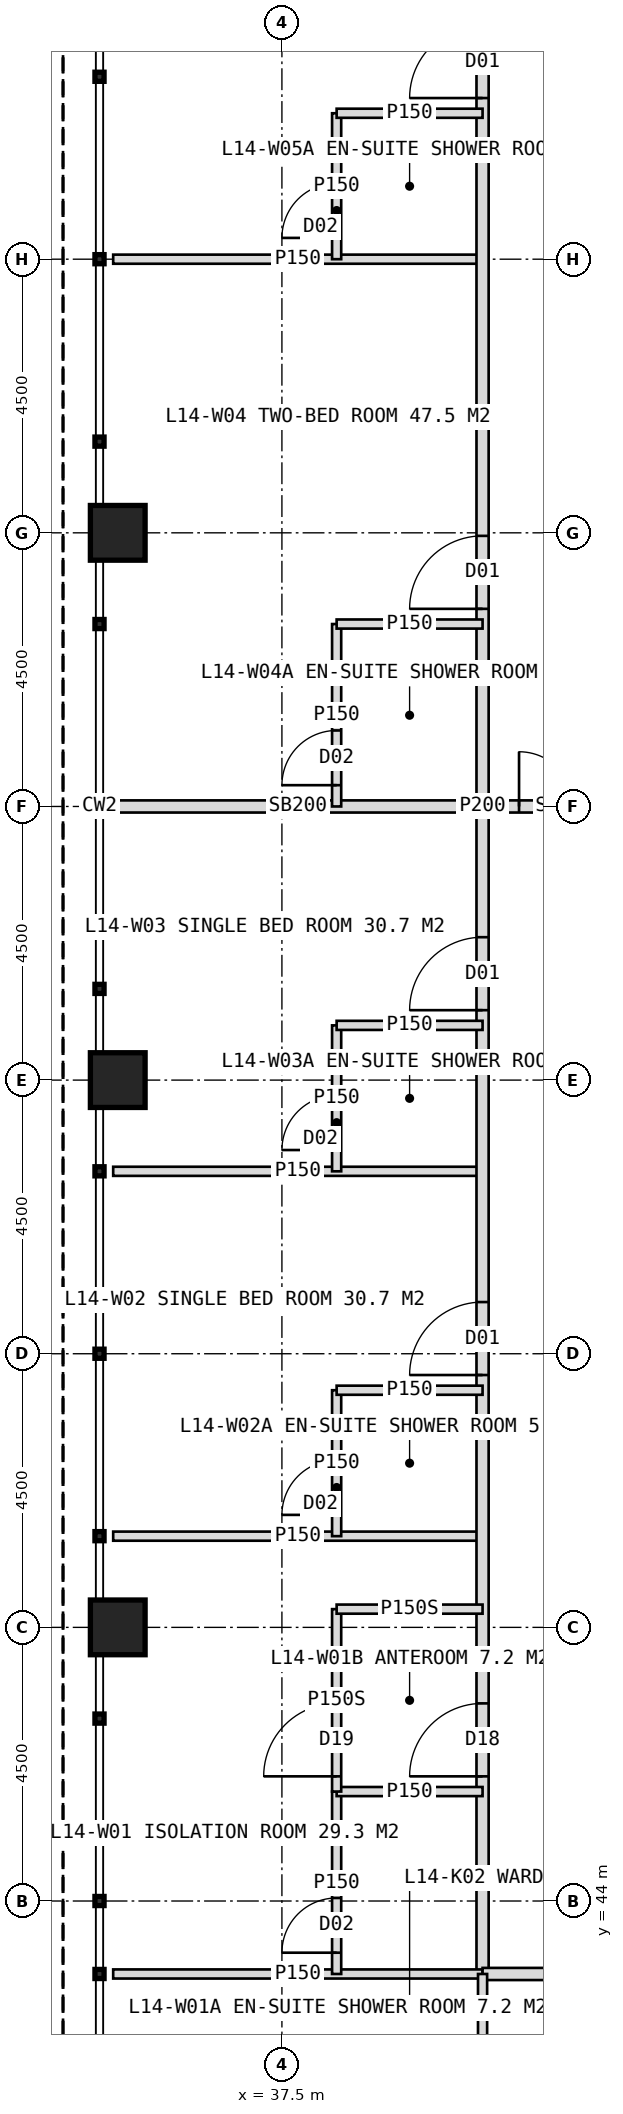
"""IFC4 building model, lengths in metres.
Left out: names, types, materials, properties, quantities, classifications, styles, units other than length and angle.
Written with IfcOpenShell. Run it as: python <this file> out.ifc"""

import sys

from ifc_helpers import new_model, si_unit, direction, frame, frame_2d, origin, origin_2d, place, context, subcontext, project, spatial, rectangle, hollow_rectangle, extrude, element, fill, save


model = new_model("IFC4")
c1 = context("Model", 3, precision=1e-05, world=origin(), true_north=direction((0.0, 1.0)))
c2 = subcontext(c1, "Body", "Model", "MODEL_VIEW")
j1 = project(units=[si_unit("LENGTHUNIT", "METRE"), si_unit("PLANEANGLEUNIT", "RADIAN")], contexts=[c1])
p1 = place(None, origin())
s1 = spatial("IfcSite", under=j1, at=p1, CompositionType="ELEMENT")
p2 = place(p1, origin())
s2 = spatial("IfcBuilding", under=s1, at=p2, CompositionType="ELEMENT")
p3 = place(p2, frame((0.0, 0.0, 63.0)))
s3 = spatial("IfcBuildingStorey", under=s2, at=p3, CompositionType="ELEMENT", Elevation=63.0)
for number, where, z_axis, x_axis in (
    (1, (34.8, 48.5, 0.0), (0.0, 0.0, 1.0), (1.0, 0.0, 0.0)),
    (2, (34.8, 57.5, 0.0), (0.0, 0.0, 1.0), (1.0, 0.0, 0.0)),
    (3, (34.8, 66.5, 0.0), (0.0, 0.0, 1.0), (1.0, 0.0, 0.0)),
):
    element("IfcColumn", number, at=place(p3, frame(where, z_axis=z_axis, x_axis=x_axis)), inside=s3, PredefinedType="COLUMN", context=c2, shape_type="SweptSolid", body=[
        extrude(hollow_rectangle(XDim=0.9, YDim=0.9, WallThickness=0.08, at=origin_2d()), origin(), (0.0, 0.0, 1.0), 4.0),
    ])
for number, where, z_axis, x_axis in (
    (4, (40.8, 50.0, 0.0), (0.0, 0.0, 1.0), (-1.0, 0.0, 0.0)),
    (5, (40.8, 56.0, 0.0), (0.0, 0.0, 1.0), (-1.0, 0.0, 0.0)),
):
    element("IfcWall", number, at=place(p3, frame(where, z_axis=z_axis, x_axis=x_axis)), inside=s3, PredefinedType="PARTITIONING", context=c2, shape_type="SweptSolid", body=[
        extrude(rectangle(XDim=6.075, YDim=0.15, at=frame_2d((3.038, 0.0))), origin(), (0.0, 0.0, 1.0), 3.75),
    ])
p4 = place(p3, frame((40.8, 62.0, 0.0), z_axis=(0.0, 0.0, 1.0), x_axis=(-1.0, 0.0, 0.0)))
e6 = element("IfcWall", 6, at=p4, inside=s3, PredefinedType="SOLIDWALL", context=c2, shape_type="SweptSolid", body=[
    extrude(rectangle(XDim=6.075, YDim=0.2, at=frame_2d((3.038, 0.0))), origin(), (0.0, 0.0, 1.0), 2.75),
])
p5 = place(p3, frame((40.8, 71.0, 0.0), z_axis=(0.0, 0.0, 1.0), x_axis=(-1.0, 0.0, 0.0)))
e7 = element("IfcWall", 7, at=p5, inside=s3, PredefinedType="PARTITIONING", context=c2, shape_type="SweptSolid", body=[
    extrude(rectangle(XDim=6.075, YDim=0.15, at=frame_2d((3.038, 0.0))), origin(), (0.0, 0.0, 1.0), 3.75),
])
p6 = place(p3, frame((40.8, 42.8, 0.0), z_axis=(0.0, 0.0, 1.0), x_axis=(0.0, 1.0, 0.0)))
e8 = element("IfcWall", 8, at=p6, inside=s3, PredefinedType="PARTITIONING", context=c2, shape_type="SweptSolid", body=[
    extrude(rectangle(XDim=38.4, YDim=0.2, at=frame_2d((19.2, 0.0))), origin(), (0.0, 0.0, 1.0), 3.75),
])
p7 = place(p6, frame((3.25, 0.0, 0.0)))
e9 = element("IfcOpeningElement", 9, at=p7, cuts=e8, PredefinedType="OPENING", context=c2, shape_type="SweptSolid", body=[
    extrude(rectangle(XDim=1.2, YDim=2.2, at=frame_2d((0.6, 1.1))), frame((0.0, 0.11, 0.0), z_axis=(0.0, -1.0, 0.0), x_axis=(1.0, 0.0, 0.0)), (0.0, 0.0, 1.0), 0.22),
])
p8 = place(p6, frame((9.85, 0.0, 0.0)))
e10 = element("IfcOpeningElement", 10, at=p8, cuts=e8, PredefinedType="OPENING", context=c2, shape_type="SweptSolid", body=[
    extrude(rectangle(XDim=1.2, YDim=2.2, at=frame_2d((0.6, 1.1))), frame((0.0, 0.11, 0.0), z_axis=(0.0, -1.0, 0.0), x_axis=(1.0, 0.0, 0.0)), (0.0, 0.0, 1.0), 0.22),
])
p9 = place(p6, frame((15.85, 0.0, 0.0)))
e11 = element("IfcOpeningElement", 11, at=p9, cuts=e8, PredefinedType="OPENING", context=c2, shape_type="SweptSolid", body=[
    extrude(rectangle(XDim=1.2, YDim=2.2, at=frame_2d((0.6, 1.1))), frame((0.0, 0.11, 0.0), z_axis=(0.0, -1.0, 0.0), x_axis=(1.0, 0.0, 0.0)), (0.0, 0.0, 1.0), 0.22),
])
p10 = place(p6, frame((22.45, 0.0, 0.0)))
e12 = element("IfcOpeningElement", 12, at=p10, cuts=e8, PredefinedType="OPENING", context=c2, shape_type="SweptSolid", body=[
    extrude(rectangle(XDim=1.2, YDim=2.2, at=frame_2d((0.6, 1.1))), frame((0.0, 0.11, 0.0), z_axis=(0.0, -1.0, 0.0), x_axis=(1.0, 0.0, 0.0)), (0.0, 0.0, 1.0), 0.22),
])
p11 = place(p6, frame((30.85, 0.0, 0.0)))
e13 = element("IfcOpeningElement", 13, at=p11, cuts=e8, PredefinedType="OPENING", context=c2, shape_type="SweptSolid", body=[
    extrude(rectangle(XDim=1.2, YDim=2.2, at=frame_2d((0.6, 1.1))), frame((0.0, 0.11, 0.0), z_axis=(0.0, -1.0, 0.0), x_axis=(1.0, 0.0, 0.0)), (0.0, 0.0, 1.0), 0.22),
])
p12 = place(p3, frame((40.8, 42.8, 0.0), z_axis=(0.0, 0.0, 1.0), x_axis=(-1.0, 0.0, 0.0)))
e14 = element("IfcWall", 14, at=p12, inside=s3, PredefinedType="PARTITIONING", context=c2, shape_type="SweptSolid", body=[
    extrude(rectangle(XDim=6.075, YDim=0.15, at=frame_2d((3.038, 0.0))), origin(), (0.0, 0.0, 1.0), 3.75),
])
p13 = place(p3, frame((38.4, 42.8, 0.0), z_axis=(0.0, 0.0, 1.0), x_axis=(0.0, 1.0, 0.0)))
e15 = element("IfcWall", 15, at=p13, inside=s3, PredefinedType="PARTITIONING", context=c2, shape_type="SweptSolid", body=[
    extrude(rectangle(XDim=3.0, YDim=0.15, at=frame_2d((1.5, 0.0))), origin(), (0.0, 0.0, 1.0), 3.75),
])
p14 = place(p13, frame((0.35, 0.0, 0.0)))
e16 = element("IfcOpeningElement", 16, at=p14, cuts=e15, PredefinedType="OPENING", context=c2, shape_type="SweptSolid", body=[
    extrude(rectangle(XDim=0.9, YDim=2.1, at=frame_2d((0.45, 1.05))), frame((0.0, 0.085, 0.0), z_axis=(0.0, -1.0, 0.0), x_axis=(1.0, 0.0, 0.0)), (0.0, 0.0, 1.0), 0.17),
])
p15 = place(p3, frame((40.8, 45.8, 0.0), z_axis=(0.0, 0.0, 1.0), x_axis=(-1.0, 0.0, 0.0)))
e17 = element("IfcWall", 17, at=p15, inside=s3, PredefinedType="PARTITIONING", context=c2, shape_type="SweptSolid", body=[
    extrude(rectangle(XDim=2.4, YDim=0.15, at=frame_2d((1.2, 0.0))), origin(), (0.0, 0.0, 1.0), 3.75),
])
p16 = place(p3, frame((38.4, 45.8, 0.0), z_axis=(0.0, 0.0, 1.0), x_axis=(0.0, 1.0, 0.0)))
e18 = element("IfcWall", 18, at=p16, inside=s3, PredefinedType="PARTITIONING", context=c2, shape_type="SweptSolid", body=[
    extrude(rectangle(XDim=3.0, YDim=0.15, at=frame_2d((1.5, 0.0))), origin(), (0.0, 0.0, 1.0), 3.75),
])
p17 = place(p16, frame((0.25, 0.0, 0.0)))
e19 = element("IfcOpeningElement", 19, at=p17, cuts=e18, PredefinedType="OPENING", context=c2, shape_type="SweptSolid", body=[
    extrude(rectangle(XDim=1.2, YDim=2.2, at=frame_2d((0.6, 1.1))), frame((0.0, 0.085, 0.0), z_axis=(0.0, -1.0, 0.0), x_axis=(1.0, 0.0, 0.0)), (0.0, 0.0, 1.0), 0.17),
])
p18 = place(p3, frame((40.8, 48.8, 0.0), z_axis=(0.0, 0.0, 1.0), x_axis=(-1.0, 0.0, 0.0)))
e20 = element("IfcWall", 20, at=p18, inside=s3, PredefinedType="PARTITIONING", context=c2, shape_type="SweptSolid", body=[
    extrude(rectangle(XDim=2.4, YDim=0.15, at=frame_2d((1.2, 0.0))), origin(), (0.0, 0.0, 1.0), 3.75),
])
p19 = place(p3, frame((38.4, 50.0, 0.0), z_axis=(0.0, 0.0, 1.0), x_axis=(0.0, 1.0, 0.0)))
e21 = element("IfcWall", 21, at=p19, inside=s3, PredefinedType="PARTITIONING", context=c2, shape_type="SweptSolid", body=[
    extrude(rectangle(XDim=2.4, YDim=0.15, at=frame_2d((1.2, 0.0))), origin(), (0.0, 0.0, 1.0), 3.75),
])
p20 = place(p19, frame((0.35, 0.0, 0.0)))
e22 = element("IfcOpeningElement", 22, at=p20, cuts=e21, PredefinedType="OPENING", context=c2, shape_type="SweptSolid", body=[
    extrude(rectangle(XDim=0.9, YDim=2.1, at=frame_2d((0.45, 1.05))), frame((0.0, 0.085, 0.0), z_axis=(0.0, -1.0, 0.0), x_axis=(1.0, 0.0, 0.0)), (0.0, 0.0, 1.0), 0.17),
])
p21 = place(p3, frame((40.8, 52.4, 0.0), z_axis=(0.0, 0.0, 1.0), x_axis=(-1.0, 0.0, 0.0)))
e23 = element("IfcWall", 23, at=p21, inside=s3, PredefinedType="PARTITIONING", context=c2, shape_type="SweptSolid", body=[
    extrude(rectangle(XDim=2.4, YDim=0.15, at=frame_2d((1.2, 0.0))), origin(), (0.0, 0.0, 1.0), 3.75),
])
p22 = place(p3, frame((38.4, 56.0, 0.0), z_axis=(0.0, 0.0, 1.0), x_axis=(0.0, 1.0, 0.0)))
e24 = element("IfcWall", 24, at=p22, inside=s3, PredefinedType="PARTITIONING", context=c2, shape_type="SweptSolid", body=[
    extrude(rectangle(XDim=2.4, YDim=0.15, at=frame_2d((1.2, 0.0))), origin(), (0.0, 0.0, 1.0), 3.75),
])
p23 = place(p22, frame((0.35, 0.0, 0.0)))
e25 = element("IfcOpeningElement", 25, at=p23, cuts=e24, PredefinedType="OPENING", context=c2, shape_type="SweptSolid", body=[
    extrude(rectangle(XDim=0.9, YDim=2.1, at=frame_2d((0.45, 1.05))), frame((0.0, 0.085, 0.0), z_axis=(0.0, -1.0, 0.0), x_axis=(1.0, 0.0, 0.0)), (0.0, 0.0, 1.0), 0.17),
])
p24 = place(p3, frame((40.8, 58.4, 0.0), z_axis=(0.0, 0.0, 1.0), x_axis=(-1.0, 0.0, 0.0)))
e26 = element("IfcWall", 26, at=p24, inside=s3, PredefinedType="PARTITIONING", context=c2, shape_type="SweptSolid", body=[
    extrude(rectangle(XDim=2.4, YDim=0.15, at=frame_2d((1.2, 0.0))), origin(), (0.0, 0.0, 1.0), 3.75),
])
p25 = place(p3, frame((38.4, 62.0, 0.0), z_axis=(0.0, 0.0, 1.0), x_axis=(0.0, 1.0, 0.0)))
e27 = element("IfcWall", 27, at=p25, inside=s3, PredefinedType="PARTITIONING", context=c2, shape_type="SweptSolid", body=[
    extrude(rectangle(XDim=3.0, YDim=0.15, at=frame_2d((1.5, 0.0))), origin(), (0.0, 0.0, 1.0), 3.75),
])
p26 = place(p25, frame((0.35, 0.0, 0.0)))
e28 = element("IfcOpeningElement", 28, at=p26, cuts=e27, PredefinedType="OPENING", context=c2, shape_type="SweptSolid", body=[
    extrude(rectangle(XDim=0.9, YDim=2.1, at=frame_2d((0.45, 1.05))), frame((0.0, 0.085, 0.0), z_axis=(0.0, -1.0, 0.0), x_axis=(1.0, 0.0, 0.0)), (0.0, 0.0, 1.0), 0.17),
])
p27 = place(p3, frame((40.8, 65.0, 0.0), z_axis=(0.0, 0.0, 1.0), x_axis=(-1.0, 0.0, 0.0)))
e29 = element("IfcWall", 29, at=p27, inside=s3, PredefinedType="PARTITIONING", context=c2, shape_type="SweptSolid", body=[
    extrude(rectangle(XDim=2.4, YDim=0.15, at=frame_2d((1.2, 0.0))), origin(), (0.0, 0.0, 1.0), 3.75),
])
p28 = place(p3, frame((38.4, 71.0, 0.0), z_axis=(0.0, 0.0, 1.0), x_axis=(0.0, 1.0, 0.0)))
e30 = element("IfcWall", 30, at=p28, inside=s3, PredefinedType="PARTITIONING", context=c2, shape_type="SweptSolid", body=[
    extrude(rectangle(XDim=2.4, YDim=0.15, at=frame_2d((1.2, 0.0))), origin(), (0.0, 0.0, 1.0), 3.75),
])
p29 = place(p28, frame((0.35, 0.0, 0.0)))
e31 = element("IfcOpeningElement", 31, at=p29, cuts=e30, PredefinedType="OPENING", context=c2, shape_type="SweptSolid", body=[
    extrude(rectangle(XDim=0.9, YDim=2.1, at=frame_2d((0.45, 1.05))), frame((0.0, 0.085, 0.0), z_axis=(0.0, -1.0, 0.0), x_axis=(1.0, 0.0, 0.0)), (0.0, 0.0, 1.0), 0.17),
])
p30 = place(p3, frame((40.8, 73.4, 0.0), z_axis=(0.0, 0.0, 1.0), x_axis=(-1.0, 0.0, 0.0)))
e32 = element("IfcWall", 32, at=p30, inside=s3, PredefinedType="PARTITIONING", context=c2, shape_type="SweptSolid", body=[
    extrude(rectangle(XDim=2.4, YDim=0.15, at=frame_2d((1.2, 0.0))), origin(), (0.0, 0.0, 1.0), 3.75),
])
p31 = place(p3, frame((79.2, 42.8, 0.0), z_axis=(0.0, 0.0, 1.0), x_axis=(-1.0, 0.0, 0.0)))
e33 = element("IfcWall", 33, at=p31, inside=s3, PredefinedType="PARTITIONING", context=c2, shape_type="SweptSolid", body=[
    extrude(rectangle(XDim=38.4, YDim=0.2, at=frame_2d((19.2, 0.0))), origin(), (0.0, 0.0, 1.0), 3.75),
])
p32 = place(p31, frame((3.25, 0.0, 0.0)))
e34 = element("IfcOpeningElement", 34, at=p32, cuts=e33, PredefinedType="OPENING", context=c2, shape_type="SweptSolid", body=[
    extrude(rectangle(XDim=1.2, YDim=2.2, at=frame_2d((0.6, 1.1))), frame((0.0, 0.11, 0.0), z_axis=(0.0, -1.0, 0.0), x_axis=(1.0, 0.0, 0.0)), (0.0, 0.0, 1.0), 0.22),
])
p33 = place(p31, frame((13.45, 0.0, 0.0)))
e35 = element("IfcOpeningElement", 35, at=p33, cuts=e33, PredefinedType="OPENING", context=c2, shape_type="SweptSolid", body=[
    extrude(rectangle(XDim=1.2, YDim=2.2, at=frame_2d((0.6, 1.1))), frame((0.0, 0.11, 0.0), z_axis=(0.0, -1.0, 0.0), x_axis=(1.0, 0.0, 0.0)), (0.0, 0.0, 1.0), 0.22),
])
p34 = place(p31, frame((22.45, 0.0, 0.0)))
e36 = element("IfcOpeningElement", 36, at=p34, cuts=e33, PredefinedType="OPENING", context=c2, shape_type="SweptSolid", body=[
    extrude(rectangle(XDim=1.2, YDim=2.2, at=frame_2d((0.6, 1.1))), frame((0.0, 0.11, 0.0), z_axis=(0.0, -1.0, 0.0), x_axis=(1.0, 0.0, 0.0)), (0.0, 0.0, 1.0), 0.22),
])
p35 = place(p31, frame((30.85, 0.0, 0.0)))
e37 = element("IfcOpeningElement", 37, at=p35, cuts=e33, PredefinedType="OPENING", context=c2, shape_type="SweptSolid", body=[
    extrude(rectangle(XDim=1.2, YDim=2.2, at=frame_2d((0.6, 1.1))), frame((0.0, 0.11, 0.0), z_axis=(0.0, -1.0, 0.0), x_axis=(1.0, 0.0, 0.0)), (0.0, 0.0, 1.0), 0.22),
])
p36 = place(p3, frame((40.8, 42.8, 0.0), z_axis=(0.0, 0.0, 1.0), x_axis=(0.0, -1.0, 0.0)))
e38 = element("IfcWall", 38, at=p36, inside=s3, PredefinedType="PARTITIONING", context=c2, shape_type="SweptSolid", body=[
    extrude(rectangle(XDim=2.4, YDim=0.15, at=frame_2d((1.2, 0.0))), origin(), (0.0, 0.0, 1.0), 3.75),
])
p37 = place(p3, frame((43.5, 62.0, 0.0), z_axis=(0.0, 0.0, 1.0), x_axis=(-1.0, 0.0, 0.0)))
e39 = element("IfcWall", 39, at=p37, inside=s3, PredefinedType="SOLIDWALL", context=c2, shape_type="SweptSolid", body=[
    extrude(rectangle(XDim=2.7, YDim=0.2, at=frame_2d((1.35, 0.0))), origin(), (0.0, 0.0, 1.0), 2.75),
])
p38 = place(p37, frame((0.3, 0.0, 0.0)))
e40 = element("IfcOpeningElement", 40, at=p38, cuts=e39, PredefinedType="OPENING", context=c2, shape_type="SweptSolid", body=[
    extrude(rectangle(XDim=1.8, YDim=2.2, at=frame_2d((0.9, 1.1))), frame((0.0, 0.11, 0.0), z_axis=(0.0, -1.0, 0.0), x_axis=(1.0, 0.0, 0.0)), (0.0, 0.0, 1.0), 0.22),
])
p39 = place(p17, origin())
e41 = element("IfcDoor", 41, at=p39, inside=s3, OperationType="SINGLE_SWING_LEFT", PredefinedType="DOOR", context=c2, shape_type="SweptSolid", body=[
    extrude(rectangle(XDim=1.2, YDim=2.2, at=frame_2d((0.6, 1.1))), frame((0.0, 0.025, 0.0), z_axis=(0.0, -1.0, 0.0), x_axis=(1.0, 0.0, 0.0)), (0.0, 0.0, 1.0), 0.05),
])
fill(e19, e41)
p40 = place(p7, origin())
e42 = element("IfcDoor", 42, at=p40, inside=s3, OperationType="SINGLE_SWING_LEFT", PredefinedType="DOOR", context=c2, shape_type="SweptSolid", body=[
    extrude(rectangle(XDim=1.2, YDim=2.2, at=frame_2d((0.6, 1.1))), frame((0.0, 0.025, 0.0), z_axis=(0.0, -1.0, 0.0), x_axis=(1.0, 0.0, 0.0)), (0.0, 0.0, 1.0), 0.05),
])
fill(e9, e42)
p41 = place(p14, origin())
e43 = element("IfcDoor", 43, at=p41, inside=s3, OperationType="SINGLE_SWING_LEFT", PredefinedType="DOOR", context=c2, shape_type="SweptSolid", body=[
    extrude(rectangle(XDim=0.9, YDim=2.1, at=frame_2d((0.45, 1.05))), frame((0.0, 0.025, 0.0), z_axis=(0.0, -1.0, 0.0), x_axis=(1.0, 0.0, 0.0)), (0.0, 0.0, 1.0), 0.05),
])
fill(e16, e43)
p42 = place(p8, origin())
e44 = element("IfcDoor", 44, at=p42, inside=s3, OperationType="SINGLE_SWING_LEFT", PredefinedType="DOOR", context=c2, shape_type="SweptSolid", body=[
    extrude(rectangle(XDim=1.2, YDim=2.2, at=frame_2d((0.6, 1.1))), frame((0.0, 0.025, 0.0), z_axis=(0.0, -1.0, 0.0), x_axis=(1.0, 0.0, 0.0)), (0.0, 0.0, 1.0), 0.05),
])
fill(e10, e44)
p43 = place(p20, origin())
e45 = element("IfcDoor", 45, at=p43, inside=s3, OperationType="SINGLE_SWING_LEFT", PredefinedType="DOOR", context=c2, shape_type="SweptSolid", body=[
    extrude(rectangle(XDim=0.9, YDim=2.1, at=frame_2d((0.45, 1.05))), frame((0.0, 0.025, 0.0), z_axis=(0.0, -1.0, 0.0), x_axis=(1.0, 0.0, 0.0)), (0.0, 0.0, 1.0), 0.05),
])
fill(e22, e45)
p44 = place(p9, origin())
e46 = element("IfcDoor", 46, at=p44, inside=s3, OperationType="SINGLE_SWING_LEFT", PredefinedType="DOOR", context=c2, shape_type="SweptSolid", body=[
    extrude(rectangle(XDim=1.2, YDim=2.2, at=frame_2d((0.6, 1.1))), frame((0.0, 0.025, 0.0), z_axis=(0.0, -1.0, 0.0), x_axis=(1.0, 0.0, 0.0)), (0.0, 0.0, 1.0), 0.05),
])
fill(e11, e46)
p45 = place(p23, origin())
e47 = element("IfcDoor", 47, at=p45, inside=s3, OperationType="SINGLE_SWING_LEFT", PredefinedType="DOOR", context=c2, shape_type="SweptSolid", body=[
    extrude(rectangle(XDim=0.9, YDim=2.1, at=frame_2d((0.45, 1.05))), frame((0.0, 0.025, 0.0), z_axis=(0.0, -1.0, 0.0), x_axis=(1.0, 0.0, 0.0)), (0.0, 0.0, 1.0), 0.05),
])
fill(e25, e47)
p46 = place(p10, origin())
e48 = element("IfcDoor", 48, at=p46, inside=s3, OperationType="SINGLE_SWING_LEFT", PredefinedType="DOOR", context=c2, shape_type="SweptSolid", body=[
    extrude(rectangle(XDim=1.2, YDim=2.2, at=frame_2d((0.6, 1.1))), frame((0.0, 0.025, 0.0), z_axis=(0.0, -1.0, 0.0), x_axis=(1.0, 0.0, 0.0)), (0.0, 0.0, 1.0), 0.05),
])
fill(e12, e48)
p47 = place(p26, origin())
e49 = element("IfcDoor", 49, at=p47, inside=s3, OperationType="SINGLE_SWING_LEFT", PredefinedType="DOOR", context=c2, shape_type="SweptSolid", body=[
    extrude(rectangle(XDim=0.9, YDim=2.1, at=frame_2d((0.45, 1.05))), frame((0.0, 0.025, 0.0), z_axis=(0.0, -1.0, 0.0), x_axis=(1.0, 0.0, 0.0)), (0.0, 0.0, 1.0), 0.05),
])
fill(e28, e49)
p48 = place(p11, origin())
e50 = element("IfcDoor", 50, at=p48, inside=s3, OperationType="SINGLE_SWING_LEFT", PredefinedType="DOOR", context=c2, shape_type="SweptSolid", body=[
    extrude(rectangle(XDim=1.2, YDim=2.2, at=frame_2d((0.6, 1.1))), frame((0.0, 0.025, 0.0), z_axis=(0.0, -1.0, 0.0), x_axis=(1.0, 0.0, 0.0)), (0.0, 0.0, 1.0), 0.05),
])
fill(e13, e50)
p49 = place(p29, origin())
e51 = element("IfcDoor", 51, at=p49, inside=s3, OperationType="SINGLE_SWING_LEFT", PredefinedType="DOOR", context=c2, shape_type="SweptSolid", body=[
    extrude(rectangle(XDim=0.9, YDim=2.1, at=frame_2d((0.45, 1.05))), frame((0.0, 0.025, 0.0), z_axis=(0.0, -1.0, 0.0), x_axis=(1.0, 0.0, 0.0)), (0.0, 0.0, 1.0), 0.05),
])
fill(e31, e51)
p50 = place(p38, origin())
e52 = element("IfcDoor", 52, at=p50, inside=s3, OperationType="DOUBLE_DOOR_DOUBLE_SWING", PredefinedType="DOOR", context=c2, shape_type="SweptSolid", body=[
    extrude(rectangle(XDim=1.8, YDim=2.2, at=frame_2d((0.9, 1.1))), frame((0.0, 0.025, 0.0), z_axis=(0.0, -1.0, 0.0), x_axis=(1.0, 0.0, 0.0)), (0.0, 0.0, 1.0), 0.05),
])
fill(e40, e52)
save(model, sys.argv[1])
